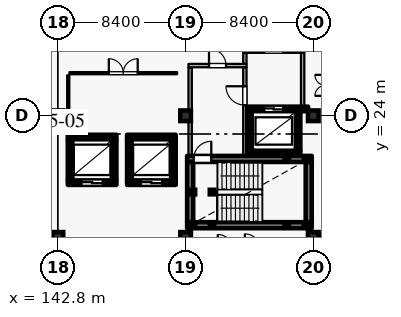
"""IFC4 building model, lengths in metres.
Left out: names, types, materials, properties, quantities, classifications, styles, units other than length and angle.
Written with IfcOpenShell. Run it as: python <this file> out.ifc"""

import sys

from ifc_helpers import new_model, si_unit, direction, frame, frame_2d, origin, origin_2d, place, context, subcontext, project, spatial, rectangle, hollow_rectangle, extrude, element, fill, save


model = new_model("IFC4")
c1 = context("Model", 3, precision=1e-05, world=origin(), true_north=direction((0.0, 1.0)))
c2 = subcontext(c1, "Body", "Model", "MODEL_VIEW")
j1 = project(units=[si_unit("LENGTHUNIT", "METRE"), si_unit("PLANEANGLEUNIT", "RADIAN")], contexts=[c1])
p1 = place(None, origin())
s1 = spatial("IfcSite", under=j1, at=p1, CompositionType="ELEMENT")
p2 = place(p1, origin())
s2 = spatial("IfcBuilding", under=s1, at=p2, CompositionType="ELEMENT")
p3 = place(p2, frame((0.0, 0.0, 28.8)))
s3 = spatial("IfcBuildingStorey", under=s2, at=p3, CompositionType="ELEMENT", Elevation=28.8)
for number, where, z_axis, x_axis in (
    (1, (142.8, 16.0, 0.0), (0.0, 0.0, 1.0), (1.0, 0.0, 0.0)),
    (2, (151.2, 24.0, 0.0), (0.0, 0.0, 1.0), (1.0, 0.0, 0.0)),
    (3, (159.6, 24.0, 0.0), (0.0, 0.0, 1.0), (1.0, 0.0, 0.0)),
    (4, (142.8, 24.0, 0.0), (0.0, 0.0, 1.0), (1.0, 0.0, 0.0)),
    (5, (151.2, 16.0, 0.0), (0.0, 0.0, 1.0), (1.0, 0.0, 0.0)),
    (6, (159.6, 16.0, 0.0), (0.0, 0.0, 1.0), (1.0, 0.0, 0.0)),
):
    element("IfcColumn", number, at=place(p3, frame(where, z_axis=z_axis, x_axis=x_axis)), inside=s3, PredefinedType="COLUMN", context=c2, shape_type="SweptSolid", body=[
        extrude(rectangle(XDim=0.7, YDim=0.7, at=origin_2d()), origin(), (0.0, 0.0, 1.0), 3.6),
    ])
p4 = place(p3, frame((155.25, 21.55, 0.0), z_axis=(0.0, 0.0, 1.0), x_axis=(1.0, 0.0, 0.0)))
e7 = element("IfcWall", 7, at=p4, inside=s3, PredefinedType="SHEAR", context=c2, shape_type="SweptSolid", body=[
    extrude(rectangle(XDim=3.5, YDim=0.3, at=frame_2d((1.75, 0.0))), origin(), (0.0, 0.0, 1.0), 3.365),
])
p5 = place(p3, frame((158.6, 21.705, 0.0), z_axis=(0.0, 0.0, 1.0), x_axis=(0.0, 1.0, 0.0)))
e8 = element("IfcWall", 8, at=p5, inside=s3, PredefinedType="SHEAR", context=c2, shape_type="SweptSolid", body=[
    extrude(rectangle(XDim=2.59, YDim=0.3, at=frame_2d((1.295, 0.0))), origin(), (0.0, 0.0, 1.0), 3.365),
])
p6 = place(p3, frame((159.26, 24.45, 0.0), z_axis=(0.0, 0.0, 1.0), x_axis=(-1.0, 0.0, 0.0)))
e9 = element("IfcWall", 9, at=p6, inside=s3, PredefinedType="SHEAR", context=c2, shape_type="SweptSolid", body=[
    extrude(rectangle(XDim=4.01, YDim=0.3, at=frame_2d((2.005, 0.0))), origin(), (0.0, 0.0, 1.0), 3.365),
])
p7 = place(p6, frame((1.635, 0.0, 0.0)))
e10 = element("IfcOpeningElement", 10, at=p7, cuts=e9, PredefinedType="OPENING", context=c2, shape_type="SweptSolid", body=[
    extrude(rectangle(XDim=1.25, YDim=2.25, at=frame_2d((0.625, 1.125))), frame((0.0, 0.16, 0.0), z_axis=(0.0, -1.0, 0.0), x_axis=(1.0, 0.0, 0.0)), (0.0, 0.0, 1.0), 0.32),
])
p8 = place(p3, frame((155.4, 24.295, 0.0), z_axis=(0.0, 0.0, 1.0), x_axis=(0.0, -1.0, 0.0)))
e11 = element("IfcWall", 11, at=p8, inside=s3, PredefinedType="SHEAR", context=c2, shape_type="SweptSolid", body=[
    extrude(rectangle(XDim=2.59, YDim=0.3, at=frame_2d((1.295, 0.0))), origin(), (0.0, 0.0, 1.0), 3.365),
])
p9 = place(p3, frame((143.45, 19.6, 0.0), z_axis=(0.0, 0.0, 1.0), x_axis=(1.0, 0.0, 0.0)))
e12 = element("IfcWall", 12, at=p9, inside=s3, PredefinedType="SHEAR", context=c2, shape_type="SweptSolid", body=[
    extrude(rectangle(XDim=3.2, YDim=0.3, at=frame_2d((1.6, 0.0))), origin(), (0.0, 0.0, 1.0), 3.365),
])
p10 = place(p9, frame((0.9, 0.0, 0.0)))
e13 = element("IfcOpeningElement", 13, at=p10, cuts=e12, PredefinedType="OPENING", context=c2, shape_type="SweptSolid", body=[
    extrude(rectangle(XDim=1.4, YDim=2.35, at=frame_2d((0.7, 1.175))), frame((0.0, 0.16, 0.0), z_axis=(0.0, -1.0, 0.0), x_axis=(1.0, 0.0, 0.0)), (0.0, 0.0, 1.0), 0.32),
])
p11 = place(p3, frame((146.5, 19.755, 0.0), z_axis=(0.0, 0.0, 1.0), x_axis=(0.0, 1.0, 0.0)))
e14 = element("IfcWall", 14, at=p11, inside=s3, PredefinedType="SHEAR", context=c2, shape_type="SweptSolid", body=[
    extrude(rectangle(XDim=2.69, YDim=0.3, at=frame_2d((1.345, 0.0))), origin(), (0.0, 0.0, 1.0), 3.365),
])
p12 = place(p3, frame((146.65, 22.6, 0.0), z_axis=(0.0, 0.0, 1.0), x_axis=(-1.0, 0.0, 0.0)))
e15 = element("IfcWall", 15, at=p12, inside=s3, PredefinedType="SHEAR", context=c2, shape_type="SweptSolid", body=[
    extrude(rectangle(XDim=3.2, YDim=0.3, at=frame_2d((1.6, 0.0))), origin(), (0.0, 0.0, 1.0), 3.365),
])
p13 = place(p3, frame((143.6, 22.445, 0.0), z_axis=(0.0, 0.0, 1.0), x_axis=(0.0, -1.0, 0.0)))
e16 = element("IfcWall", 16, at=p13, inside=s3, PredefinedType="SHEAR", context=c2, shape_type="SweptSolid", body=[
    extrude(rectangle(XDim=2.69, YDim=0.3, at=frame_2d((1.345, 0.0))), origin(), (0.0, 0.0, 1.0), 3.365),
])
p14 = place(p3, frame((147.35, 19.6, 0.0), z_axis=(0.0, 0.0, 1.0), x_axis=(1.0, 0.0, 0.0)))
e17 = element("IfcWall", 17, at=p14, inside=s3, PredefinedType="SHEAR", context=c2, shape_type="SweptSolid", body=[
    extrude(rectangle(XDim=3.2, YDim=0.3, at=frame_2d((1.6, 0.0))), origin(), (0.0, 0.0, 1.0), 3.365),
])
p15 = place(p14, frame((0.9, 0.0, 0.0)))
e18 = element("IfcOpeningElement", 18, at=p15, cuts=e17, PredefinedType="OPENING", context=c2, shape_type="SweptSolid", body=[
    extrude(rectangle(XDim=1.4, YDim=2.35, at=frame_2d((0.7, 1.175))), frame((0.0, 0.16, 0.0), z_axis=(0.0, -1.0, 0.0), x_axis=(1.0, 0.0, 0.0)), (0.0, 0.0, 1.0), 0.32),
])
p16 = place(p3, frame((150.4, 19.755, 0.0), z_axis=(0.0, 0.0, 1.0), x_axis=(0.0, 1.0, 0.0)))
e19 = element("IfcWall", 19, at=p16, inside=s3, PredefinedType="SHEAR", context=c2, shape_type="SweptSolid", body=[
    extrude(rectangle(XDim=2.69, YDim=0.3, at=frame_2d((1.345, 0.0))), origin(), (0.0, 0.0, 1.0), 3.365),
])
p17 = place(p3, frame((150.55, 22.6, 0.0), z_axis=(0.0, 0.0, 1.0), x_axis=(-1.0, 0.0, 0.0)))
e20 = element("IfcWall", 20, at=p17, inside=s3, PredefinedType="SHEAR", context=c2, shape_type="SweptSolid", body=[
    extrude(rectangle(XDim=3.2, YDim=0.3, at=frame_2d((1.6, 0.0))), origin(), (0.0, 0.0, 1.0), 3.365),
])
p18 = place(p3, frame((147.5, 22.445, 0.0), z_axis=(0.0, 0.0, 1.0), x_axis=(0.0, -1.0, 0.0)))
e21 = element("IfcWall", 21, at=p18, inside=s3, PredefinedType="SHEAR", context=c2, shape_type="SweptSolid", body=[
    extrude(rectangle(XDim=2.69, YDim=0.3, at=frame_2d((1.345, 0.0))), origin(), (0.0, 0.0, 1.0), 3.365),
])
p19 = place(p3, frame((151.3, 16.8, 0.0), z_axis=(0.0, 0.0, 1.0), x_axis=(1.0, 0.0, 0.0)))
e22 = element("IfcWall", 22, at=p19, inside=s3, PredefinedType="SHEAR", context=c2, shape_type="SweptSolid", body=[
    extrude(rectangle(XDim=8.2, YDim=0.4, at=frame_2d((4.1, 0.0))), origin(), (0.0, 0.0, 1.0), 3.365),
])
p20 = place(p3, frame((159.3, 17.005, 0.0), z_axis=(0.0, 0.0, 1.0), x_axis=(0.0, 1.0, 0.0)))
e23 = element("IfcWall", 23, at=p20, inside=s3, PredefinedType="SHEAR", context=c2, shape_type="SweptSolid", body=[
    extrude(rectangle(XDim=3.95, YDim=0.4, at=frame_2d((1.975, 0.0))), origin(), (0.0, 0.0, 1.0), 3.365),
])
p21 = place(p3, frame((151.3, 21.16, 0.0), z_axis=(0.0, 0.0, 1.0), x_axis=(1.0, 0.0, 0.0)))
e24 = element("IfcWall", 24, at=p21, inside=s3, PredefinedType="SHEAR", context=c2, shape_type="SweptSolid", body=[
    extrude(rectangle(XDim=8.2, YDim=0.4, at=frame_2d((4.1, 0.0))), origin(), (0.0, 0.0, 1.0), 3.365),
])
p22 = place(p21, frame((0.43, 0.0, 0.0)))
e25 = element("IfcOpeningElement", 25, at=p22, cuts=e24, PredefinedType="OPENING", context=c2, shape_type="SweptSolid", body=[
    extrude(rectangle(XDim=1.16, YDim=2.2, at=frame_2d((0.58, 1.1))), frame((0.0, 0.21, 0.0), z_axis=(0.0, -1.0, 0.0), x_axis=(1.0, 0.0, 0.0)), (0.0, 0.0, 1.0), 0.42),
])
p23 = place(p3, frame((151.5, 17.005, 0.0), z_axis=(0.0, 0.0, 1.0), x_axis=(0.0, 1.0, 0.0)))
e26 = element("IfcWall", 26, at=p23, inside=s3, PredefinedType="SHEAR", context=c2, shape_type="SweptSolid", body=[
    extrude(rectangle(XDim=3.95, YDim=0.4, at=frame_2d((1.975, 0.0))), origin(), (0.0, 0.0, 1.0), 3.365),
])
p24 = place(p3, frame((151.5, 21.365, 0.0), z_axis=(0.0, 0.0, 1.0), x_axis=(0.0, 1.0, 0.0)))
e27 = element("IfcWall", 27, at=p24, inside=s3, PredefinedType="PARTITIONING", context=c2, shape_type="SweptSolid", body=[
    extrude(rectangle(XDim=5.82, YDim=0.22, at=frame_2d((2.91, 0.0))), origin(), (0.0, 0.0, 1.0), 3.365),
])
p25 = place(p3, frame((151.39, 27.3, 0.0), z_axis=(0.0, 0.0, 1.0), x_axis=(1.0, 0.0, 0.0)))
e28 = element("IfcWall", 28, at=p25, inside=s3, PredefinedType="PARTITIONING", context=c2, shape_type="SweptSolid", body=[
    extrude(rectangle(XDim=3.82, YDim=0.22, at=frame_2d((1.91, 0.0))), origin(), (0.0, 0.0, 1.0), 3.365),
])
p26 = place(p25, frame((1.35, 0.0, 0.0)))
e29 = element("IfcOpeningElement", 29, at=p26, cuts=e28, PredefinedType="OPENING", context=c2, shape_type="SweptSolid", body=[
    extrude(rectangle(XDim=1.12, YDim=2.2, at=frame_2d((0.56, 1.1))), frame((0.0, 0.12, 0.0), z_axis=(0.0, -1.0, 0.0), x_axis=(1.0, 0.0, 0.0)), (0.0, 0.0, 1.0), 0.24),
])
p27 = place(p3, frame((155.1, 21.365, 0.0), z_axis=(0.0, 0.0, 1.0), x_axis=(0.0, 1.0, 0.0)))
e30 = element("IfcWall", 30, at=p27, inside=s3, PredefinedType="PARTITIONING", context=c2, shape_type="SweptSolid", body=[
    extrude(rectangle(XDim=5.82, YDim=0.22, at=frame_2d((2.91, 0.0))), origin(), (0.0, 0.0, 1.0), 3.365),
])
p28 = place(p27, frame((3.335, 0.0, 0.0)))
e31 = element("IfcOpeningElement", 31, at=p28, cuts=e30, PredefinedType="OPENING", context=c2, shape_type="SweptSolid", body=[
    extrude(rectangle(XDim=1.24, YDim=2.2, at=frame_2d((0.62, 1.1))), frame((0.0, 0.12, 0.0), z_axis=(0.0, -1.0, 0.0), x_axis=(1.0, 0.0, 0.0)), (0.0, 0.0, 1.0), 0.24),
])
p29 = place(p3, frame((155.1, 27.415, 0.0), z_axis=(0.0, 0.0, 1.0), x_axis=(0.0, 1.0, 0.0)))
e32 = element("IfcWall", 32, at=p29, inside=s3, PredefinedType="PARTITIONING", context=c2, shape_type="SweptSolid", body=[
    extrude(rectangle(XDim=0.72, YDim=0.22, at=frame_2d((0.36, 0.0))), origin(), (0.0, 0.0, 1.0), 3.365),
])
p30 = place(p3, frame((158.9, 24.605, 0.0), z_axis=(0.0, 0.0, 1.0), x_axis=(0.0, 1.0, 0.0)))
e33 = element("IfcWall", 33, at=p30, inside=s3, PredefinedType="PARTITIONING", context=c2, shape_type="SweptSolid", body=[
    extrude(rectangle(XDim=3.53, YDim=0.22, at=frame_2d((1.765, 0.0))), origin(), (0.0, 0.0, 1.0), 3.365),
])
p31 = place(p3, frame((154.99, 28.25, 0.0), z_axis=(0.0, 0.0, 1.0), x_axis=(1.0, 0.0, 0.0)))
e34 = element("IfcWall", 34, at=p31, inside=s3, PredefinedType="PARTITIONING", context=c2, shape_type="SweptSolid", body=[
    extrude(rectangle(XDim=4.02, YDim=0.22, at=frame_2d((2.01, 0.0))), origin(), (0.0, 0.0, 1.0), 3.365),
])
p32 = place(p31, frame((1.39, 0.0, 0.0)))
e35 = element("IfcOpeningElement", 35, at=p32, cuts=e34, PredefinedType="OPENING", context=c2, shape_type="SweptSolid", body=[
    extrude(rectangle(XDim=1.24, YDim=2.2, at=frame_2d((0.62, 1.1))), frame((0.0, 0.12, 0.0), z_axis=(0.0, -1.0, 0.0), x_axis=(1.0, 0.0, 0.0)), (0.0, 0.0, 1.0), 0.24),
])
for number, where, z_axis, x_axis in (
    (36, (151.68, 16.8, 0.0), (0.0, 0.0, 1.0), (1.0, 0.0, 0.0)),
    (37, (151.68, 18.98, 0.0), (0.0, 0.0, 1.0), (1.0, 0.0, 0.0)),
    (38, (152.94, 16.8, 0.0), (0.0, 0.0, 1.0), (1.0, 0.0, 0.0)),
    (39, (152.94, 18.98, 0.0), (0.0, 0.0, 1.0), (1.0, 0.0, 0.0)),
    (40, (157.86, 16.8, -1.8), (0.0, 0.0, 1.0), (1.0, 0.0, 0.0)),
    (41, (157.86, 21.16, -1.8), (0.0, 0.0, 1.0), (1.0, 0.0, 0.0)),
    (42, (159.12, 16.8, -1.8), (0.0, 0.0, 1.0), (1.0, 0.0, 0.0)),
    (43, (159.12, 21.16, -1.8), (0.0, 0.0, 1.0), (1.0, 0.0, 0.0)),
):
    element("IfcColumn", number, at=place(p3, frame(where, z_axis=z_axis, x_axis=x_axis)), inside=s3, PredefinedType="COLUMN", context=c2, shape_type="SweptSolid", body=[
        extrude(hollow_rectangle(XDim=0.3, YDim=0.3, WallThickness=0.012, at=origin_2d()), origin(), (0.0, 0.0, 1.0), 3.42),
    ])
p33 = place(p3, frame((143.56, 26.8, 0.0), z_axis=(0.0, 0.0, 1.0), x_axis=(1.0, 0.0, 0.0)))
e44 = element("IfcWall", 44, at=p33, inside=s3, PredefinedType="PARTITIONING", context=c2, shape_type="SweptSolid", body=[
    extrude(rectangle(XDim=7.08, YDim=0.14, at=frame_2d((3.54, 0.0))), origin(), (0.0, 0.0, 1.0), 3.365),
])
p34 = place(p33, frame((2.59, 0.0, 0.0)))
e45 = element("IfcOpeningElement", 45, at=p34, cuts=e44, PredefinedType="OPENING", context=c2, shape_type="SweptSolid", body=[
    extrude(rectangle(XDim=1.9, YDim=2.4, at=frame_2d((0.95, 1.2))), frame((0.0, 0.08, 0.0), z_axis=(0.0, -1.0, 0.0), x_axis=(1.0, 0.0, 0.0)), (0.0, 0.0, 1.0), 0.16),
])
p35 = place(p3, frame((143.48, 23.45, 0.0), z_axis=(0.0, 0.0, 1.0), x_axis=(0.0, 1.0, 0.0)))
e46 = element("IfcWall", 46, at=p35, inside=s3, PredefinedType="PARTITIONING", context=c2, shape_type="SweptSolid", body=[
    extrude(rectangle(XDim=3.21, YDim=0.14, at=frame_2d((1.605, 0.0))), origin(), (0.0, 0.0, 1.0), 3.365),
])
p36 = place(p7, origin())
e47 = element("IfcDoor", 47, at=p36, inside=s3, OperationType="DOUBLE_DOOR_SLIDING", PredefinedType="DOOR", context=c2, shape_type="SweptSolid", body=[
    extrude(rectangle(XDim=1.25, YDim=2.25, at=frame_2d((0.625, 1.125))), frame((0.0, 0.025, 0.0), z_axis=(0.0, -1.0, 0.0), x_axis=(1.0, 0.0, 0.0)), (0.0, 0.0, 1.0), 0.05),
])
fill(e10, e47)
p37 = place(p10, origin())
e48 = element("IfcDoor", 48, at=p37, inside=s3, OperationType="DOUBLE_DOOR_SLIDING", PredefinedType="DOOR", context=c2, shape_type="SweptSolid", body=[
    extrude(rectangle(XDim=1.4, YDim=2.35, at=frame_2d((0.7, 1.175))), frame((0.0, 0.025, 0.0), z_axis=(0.0, -1.0, 0.0), x_axis=(1.0, 0.0, 0.0)), (0.0, 0.0, 1.0), 0.05),
])
fill(e13, e48)
p38 = place(p15, origin())
e49 = element("IfcDoor", 49, at=p38, inside=s3, OperationType="DOUBLE_DOOR_SLIDING", PredefinedType="DOOR", context=c2, shape_type="SweptSolid", body=[
    extrude(rectangle(XDim=1.4, YDim=2.35, at=frame_2d((0.7, 1.175))), frame((0.0, 0.025, 0.0), z_axis=(0.0, -1.0, 0.0), x_axis=(1.0, 0.0, 0.0)), (0.0, 0.0, 1.0), 0.05),
])
fill(e18, e49)
p39 = place(p22, origin())
e50 = element("IfcDoor", 50, at=p39, inside=s3, OperationType="SINGLE_SWING_RIGHT", PredefinedType="DOOR", context=c2, shape_type="SweptSolid", body=[
    extrude(rectangle(XDim=1.16, YDim=2.2, at=frame_2d((0.58, 1.1))), frame((0.0, 0.025, 0.0), z_axis=(0.0, -1.0, 0.0), x_axis=(1.0, 0.0, 0.0)), (0.0, 0.0, 1.0), 0.05),
])
fill(e25, e50)
p40 = place(p26, origin())
e51 = element("IfcDoor", 51, at=p40, inside=s3, OperationType="SINGLE_SWING_LEFT", PredefinedType="DOOR", context=c2, shape_type="SweptSolid", body=[
    extrude(rectangle(XDim=1.12, YDim=2.2, at=frame_2d((0.56, 1.1))), frame((0.0, 0.025, 0.0), z_axis=(0.0, -1.0, 0.0), x_axis=(1.0, 0.0, 0.0)), (0.0, 0.0, 1.0), 0.05),
])
fill(e29, e51)
p41 = place(p28, origin())
e52 = element("IfcDoor", 52, at=p41, inside=s3, OperationType="SINGLE_SWING_RIGHT", PredefinedType="DOOR", context=c2, shape_type="SweptSolid", body=[
    extrude(rectangle(XDim=1.24, YDim=2.2, at=frame_2d((0.62, 1.1))), frame((0.0, 0.025, 0.0), z_axis=(0.0, -1.0, 0.0), x_axis=(1.0, 0.0, 0.0)), (0.0, 0.0, 1.0), 0.05),
])
fill(e31, e52)
p42 = place(p34, origin())
e53 = element("IfcDoor", 53, at=p42, inside=s3, OperationType="DOUBLE_DOOR_SINGLE_SWING", PredefinedType="DOOR", context=c2, shape_type="SweptSolid", body=[
    extrude(rectangle(XDim=1.9, YDim=2.4, at=frame_2d((0.95, 1.2))), frame((0.0, 0.025, 0.0), z_axis=(0.0, -1.0, 0.0), x_axis=(1.0, 0.0, 0.0)), (0.0, 0.0, 1.0), 0.05),
])
fill(e45, e53)
save(model, sys.argv[1])
